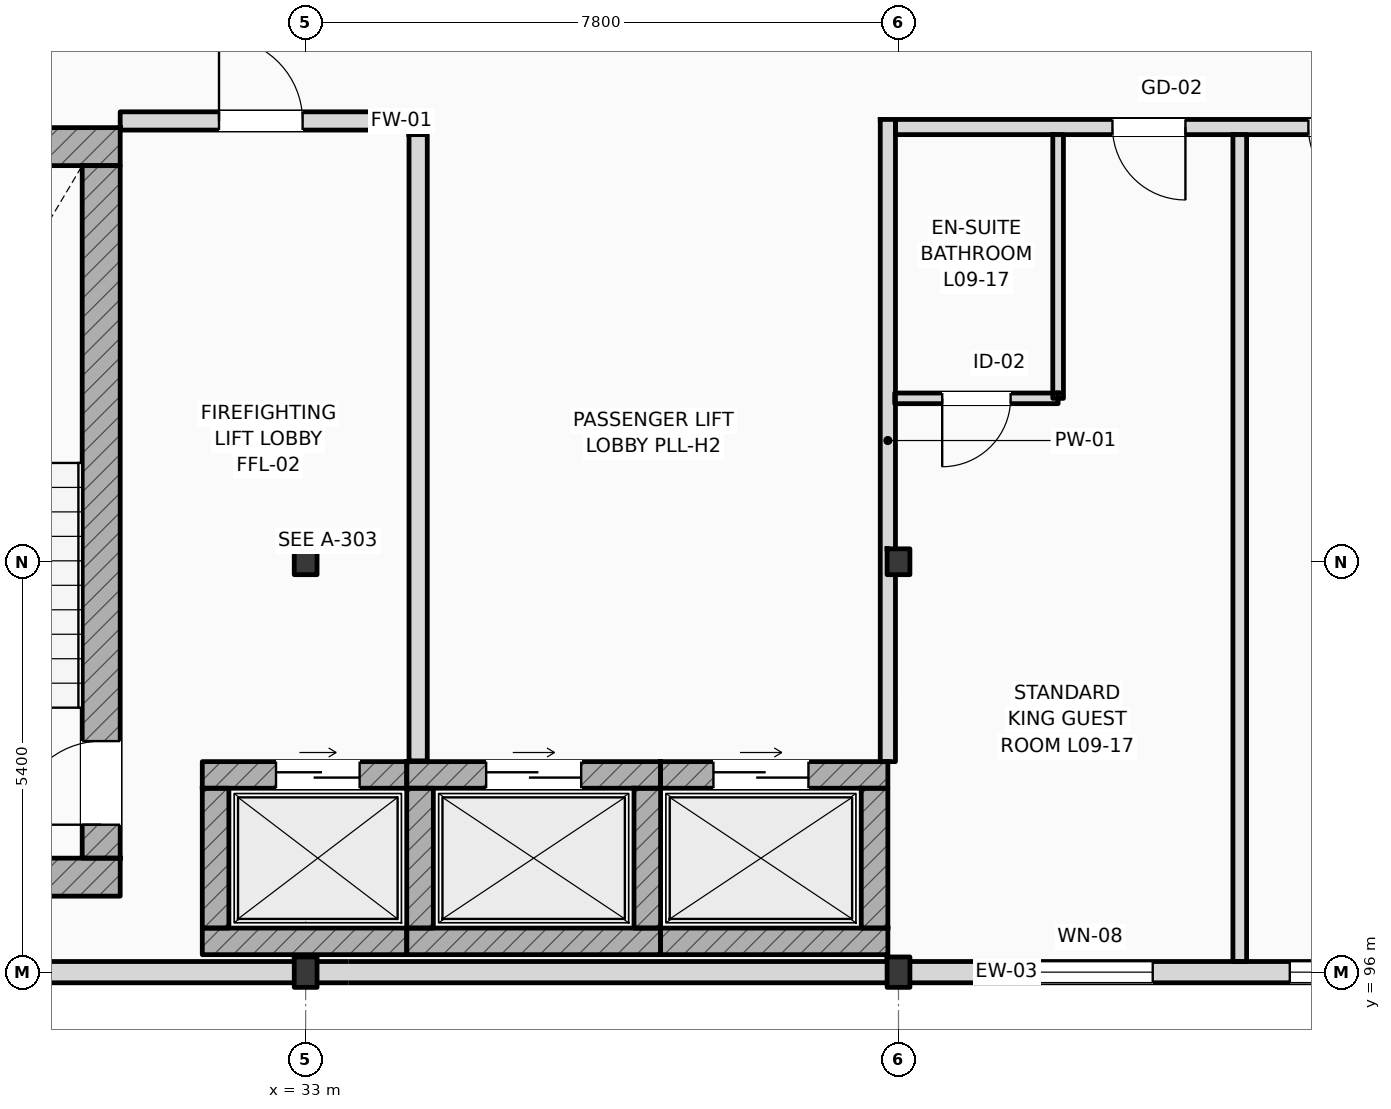
"""IFC4 building model, lengths in metres.
Left out: names, types, materials, properties, quantities, classifications, styles, units other than length and angle.
Written with IfcOpenShell. Run it as: python <this file> out.ifc"""

import sys

from ifc_helpers import new_model, si_unit, direction, frame, frame_2d, origin, origin_2d, place, context, subcontext, project, spatial, rectangle, i_section, extrude, element, fill, save


model = new_model("IFC4")
c1 = context("Model", 3, precision=1e-05, world=origin(), true_north=direction((0.0, 1.0)))
c2 = subcontext(c1, "Body", "Model", "MODEL_VIEW")
j1 = project(units=[si_unit("LENGTHUNIT", "METRE"), si_unit("PLANEANGLEUNIT", "RADIAN")], contexts=[c1])
p1 = place(None, origin())
s1 = spatial("IfcSite", under=j1, at=p1, CompositionType="ELEMENT")
p2 = place(p1, origin())
s2 = spatial("IfcBuilding", under=s1, at=p2, CompositionType="ELEMENT")
p3 = place(p2, frame((0.0, 0.0, 39.0)))
s3 = spatial("IfcBuildingStorey", under=s2, at=p3, CompositionType="ELEMENT", Elevation=39.0)
p4 = place(p3, frame((33.0, 96.0, 0.0), z_axis=(0.0, 0.0, 1.0), x_axis=(1.0, 0.0, 0.0)))
e1 = element("IfcColumn", 1, at=p4, inside=s3, PredefinedType="COLUMN", context=c2, shape_type="SweptSolid", body=[
    extrude(i_section(OverallWidth=0.3, OverallDepth=0.4, WebThickness=0.013, FlangeThickness=0.024, FilletRadius=0.027, at=origin_2d()), origin(), (0.0, 0.0, 1.0), 3.6),
])
p5 = place(p3, frame((33.0, 101.4, 0.0), z_axis=(0.0, 0.0, 1.0), x_axis=(1.0, 0.0, 0.0)))
e2 = element("IfcColumn", 2, at=p5, inside=s3, PredefinedType="COLUMN", context=c2, shape_type="SweptSolid", body=[
    extrude(i_section(OverallWidth=0.3, OverallDepth=0.34, WebThickness=0.012, FlangeThickness=0.021, FilletRadius=0.027, at=origin_2d()), origin(), (0.0, 0.0, 1.0), 3.6),
])
p6 = place(p3, frame((40.8, 96.0, 0.0), z_axis=(0.0, 0.0, 1.0), x_axis=(1.0, 0.0, 0.0)))
e3 = element("IfcColumn", 3, at=p6, inside=s3, PredefinedType="COLUMN", context=c2, shape_type="SweptSolid", body=[
    extrude(i_section(OverallWidth=0.3, OverallDepth=0.4, WebThickness=0.013, FlangeThickness=0.024, FilletRadius=0.027, at=origin_2d()), origin(), (0.0, 0.0, 1.0), 3.6),
])
p7 = place(p3, frame((40.8, 101.4, 0.0), z_axis=(0.0, 0.0, 1.0), x_axis=(1.0, 0.0, 0.0)))
e4 = element("IfcColumn", 4, at=p7, inside=s3, PredefinedType="COLUMN", context=c2, shape_type="SweptSolid", body=[
    extrude(i_section(OverallWidth=0.3, OverallDepth=0.34, WebThickness=0.012, FlangeThickness=0.021, FilletRadius=0.027, at=origin_2d()), origin(), (0.0, 0.0, 1.0), 3.6),
])
for number, where, z_axis, x_axis in (
    (5, (25.4, 106.862, 0.0), (0.0, 0.0, 1.0), (1.0, 0.0, 0.0)),
    (6, (25.4, 97.25, 0.0), (0.0, 0.0, 1.0), (1.0, 0.0, 0.0)),
):
    element("IfcWall", number, at=place(p3, frame(where, z_axis=z_axis, x_axis=x_axis)), inside=s3, PredefinedType="SHEAR", context=c2, shape_type="SweptSolid", body=[
        extrude(rectangle(XDim=5.16, YDim=0.5, at=frame_2d((2.58, 0.0))), origin(), (0.0, 0.0, 1.0), 3.6),
    ])
p8 = place(p3, frame((30.31, 97.5, 0.0), z_axis=(0.0, 0.0, 1.0), x_axis=(0.0, 1.0, 0.0)))
e7 = element("IfcWall", 7, at=p8, inside=s3, PredefinedType="SHEAR", context=c2, shape_type="SweptSolid", body=[
    extrude(rectangle(XDim=9.112, YDim=0.5, at=frame_2d((4.556, 0.0))), origin(), (0.0, 0.0, 1.0), 3.6),
])
p9 = place(p8, frame((0.44, 0.0, 0.0)))
e8 = element("IfcOpeningElement", 8, at=p9, cuts=e7, PredefinedType="OPENING", context=c2, shape_type="SweptSolid", body=[
    extrude(rectangle(XDim=1.1, YDim=2.2, at=frame_2d((0.55, 1.1))), frame((0.0, 0.26, 0.0), z_axis=(0.0, -1.0, 0.0), x_axis=(1.0, 0.0, 0.0)), (0.0, 0.0, 1.0), 0.52),
])
p10 = place(p3, frame((25.2, 96.0, 0.0), z_axis=(0.0, 0.0, 1.0), x_axis=(1.0, 0.0, 0.0)))
e9 = element("IfcWall", 9, at=p10, inside=s3, PredefinedType="STANDARD", context=c2, shape_type="SweptSolid", body=[
    extrude(rectangle(XDim=70.2, YDim=0.28, at=frame_2d((35.1, 0.0))), origin(), (0.0, 0.0, 1.0), 2.92),
])
p11 = place(p10, frame((16.695, 0.0, 0.9)))
e10 = element("IfcOpeningElement", 10, at=p11, cuts=e9, PredefinedType="OPENING", context=c2, shape_type="SweptSolid", body=[
    extrude(rectangle(XDim=2.25, YDim=1.84, at=frame_2d((1.125, 0.92))), frame((0.0, 0.15, 0.0), z_axis=(0.0, -1.0, 0.0), x_axis=(1.0, 0.0, 0.0)), (0.0, 0.0, 1.0), 0.3),
])
p12 = place(p10, frame((20.748, 0.0, 0.9)))
e11 = element("IfcOpeningElement", 11, at=p12, cuts=e9, PredefinedType="OPENING", context=c2, shape_type="SweptSolid", body=[
    extrude(rectangle(XDim=1.8, YDim=1.84, at=frame_2d((0.9, 0.92))), frame((0.0, 0.15, 0.0), z_axis=(0.0, -1.0, 0.0), x_axis=(1.0, 0.0, 0.0)), (0.0, 0.0, 1.0), 0.3),
])
p13 = place(p10, frame((25.963, 0.0, 0.9)))
e12 = element("IfcOpeningElement", 12, at=p13, cuts=e9, PredefinedType="OPENING", context=c2, shape_type="SweptSolid", body=[
    extrude(rectangle(XDim=2.55, YDim=1.84, at=frame_2d((1.275, 0.92))), frame((0.0, 0.15, 0.0), z_axis=(0.0, -1.0, 0.0), x_axis=(1.0, 0.0, 0.0)), (0.0, 0.0, 1.0), 0.3),
])
p14 = place(p10, frame((32.177, 0.0, 0.9)))
e13 = element("IfcOpeningElement", 13, at=p14, cuts=e9, PredefinedType="OPENING", context=c2, shape_type="SweptSolid", body=[
    extrude(rectangle(XDim=1.35, YDim=1.84, at=frame_2d((0.675, 0.92))), frame((0.0, 0.15, 0.0), z_axis=(0.0, -1.0, 0.0), x_axis=(1.0, 0.0, 0.0)), (0.0, 0.0, 1.0), 0.3),
])
p15 = place(p10, frame((35.267, 0.0, 0.9)))
e14 = element("IfcOpeningElement", 14, at=p15, cuts=e9, PredefinedType="OPENING", context=c2, shape_type="SweptSolid", body=[
    extrude(rectangle(XDim=2.85, YDim=1.84, at=frame_2d((1.425, 0.92))), frame((0.0, 0.15, 0.0), z_axis=(0.0, -1.0, 0.0), x_axis=(1.0, 0.0, 0.0)), (0.0, 0.0, 1.0), 0.3),
])
p16 = place(p10, frame((55.56, 0.0, 0.9)))
e15 = element("IfcOpeningElement", 15, at=p16, cuts=e9, PredefinedType="OPENING", context=c2, shape_type="SweptSolid", body=[
    extrude(rectangle(XDim=1.8, YDim=1.84, at=frame_2d((0.9, 0.92))), frame((0.0, 0.15, 0.0), z_axis=(0.0, -1.0, 0.0), x_axis=(1.0, 0.0, 0.0)), (0.0, 0.0, 1.0), 0.3),
])
p17 = place(p10, frame((59.093, 0.0, 0.9)))
e16 = element("IfcOpeningElement", 16, at=p17, cuts=e9, PredefinedType="OPENING", context=c2, shape_type="SweptSolid", body=[
    extrude(rectangle(XDim=2.412, YDim=1.84, at=frame_2d((1.206, 0.92))), frame((0.0, 0.15, 0.0), z_axis=(0.0, -1.0, 0.0), x_axis=(1.0, 0.0, 0.0)), (0.0, 0.0, 1.0), 0.3),
])
p18 = place(p10, frame((63.325, 0.0, 0.9)))
e17 = element("IfcOpeningElement", 17, at=p18, cuts=e9, PredefinedType="OPENING", context=c2, shape_type="SweptSolid", body=[
    extrude(rectangle(XDim=1.8, YDim=1.84, at=frame_2d((0.9, 0.92))), frame((0.0, 0.15, 0.0), z_axis=(0.0, -1.0, 0.0), x_axis=(1.0, 0.0, 0.0)), (0.0, 0.0, 1.0), 0.3),
])
p19 = place(p10, frame((66.718, 0.0, 0.9)))
e18 = element("IfcOpeningElement", 18, at=p19, cuts=e9, PredefinedType="OPENING", context=c2, shape_type="SweptSolid", body=[
    extrude(rectangle(XDim=2.472, YDim=1.84, at=frame_2d((1.236, 0.92))), frame((0.0, 0.15, 0.0), z_axis=(0.0, -1.0, 0.0), x_axis=(1.0, 0.0, 0.0)), (0.0, 0.0, 1.0), 0.3),
])
p20 = place(p3, frame((31.64, 98.595, 0.0), z_axis=(0.0, 0.0, 1.0), x_axis=(1.0, 0.0, 0.0)))
e19 = element("IfcWall", 19, at=p20, inside=s3, PredefinedType="SHEAR", context=c2, shape_type="SweptSolid", body=[
    extrude(rectangle(XDim=2.69, YDim=0.35, at=frame_2d((1.345, 0.0))), origin(), (0.0, 0.0, 1.0), 3.38),
])
p21 = place(p20, frame((0.97, 0.0, 0.0)))
e20 = element("IfcOpeningElement", 20, at=p21, cuts=e19, PredefinedType="OPENING", context=c2, shape_type="SweptSolid", body=[
    extrude(rectangle(XDim=1.1, YDim=2.2, at=frame_2d((0.55, 1.1))), frame((0.0, 0.185, 0.0), z_axis=(0.0, -1.0, 0.0), x_axis=(1.0, 0.0, 0.0)), (0.0, 0.0, 1.0), 0.37),
])
p22 = place(p3, frame((31.64, 96.405, 0.0), z_axis=(0.0, 0.0, 1.0), x_axis=(1.0, 0.0, 0.0)))
e21 = element("IfcWall", 21, at=p22, inside=s3, PredefinedType="SHEAR", context=c2, shape_type="SweptSolid", body=[
    extrude(rectangle(XDim=2.69, YDim=0.35, at=frame_2d((1.345, 0.0))), origin(), (0.0, 0.0, 1.0), 3.38),
])
p23 = place(p3, frame((31.815, 96.58, 0.0), z_axis=(0.0, 0.0, 1.0), x_axis=(0.0, 1.0, 0.0)))
e22 = element("IfcWall", 22, at=p23, inside=s3, PredefinedType="SHEAR", context=c2, shape_type="SweptSolid", body=[
    extrude(rectangle(XDim=1.84, YDim=0.35, at=frame_2d((0.92, 0.0))), origin(), (0.0, 0.0, 1.0), 3.38),
])
p24 = place(p3, frame((34.33, 98.595, 0.0), z_axis=(0.0, 0.0, 1.0), x_axis=(1.0, 0.0, 0.0)))
e23 = element("IfcWall", 23, at=p24, inside=s3, PredefinedType="SHEAR", context=c2, shape_type="SweptSolid", body=[
    extrude(rectangle(XDim=3.34, YDim=0.35, at=frame_2d((1.67, 0.0))), origin(), (0.0, 0.0, 1.0), 3.38),
])
p25 = place(p24, frame((1.045, 0.0, 0.0)))
e24 = element("IfcOpeningElement", 24, at=p25, cuts=e23, PredefinedType="OPENING", context=c2, shape_type="SweptSolid", body=[
    extrude(rectangle(XDim=1.25, YDim=2.25, at=frame_2d((0.625, 1.125))), frame((0.0, 0.185, 0.0), z_axis=(0.0, -1.0, 0.0), x_axis=(1.0, 0.0, 0.0)), (0.0, 0.0, 1.0), 0.37),
])
p26 = place(p3, frame((34.33, 96.405, 0.0), z_axis=(0.0, 0.0, 1.0), x_axis=(1.0, 0.0, 0.0)))
e25 = element("IfcWall", 25, at=p26, inside=s3, PredefinedType="SHEAR", context=c2, shape_type="SweptSolid", body=[
    extrude(rectangle(XDim=3.34, YDim=0.35, at=frame_2d((1.67, 0.0))), origin(), (0.0, 0.0, 1.0), 3.38),
])
for number, where, z_axis, x_axis in (
    (26, (34.505, 96.58, 0.0), (0.0, 0.0, 1.0), (0.0, 1.0, 0.0)),
    (27, (37.495, 96.58, 0.0), (0.0, 0.0, 1.0), (0.0, 1.0, 0.0)),
):
    element("IfcWall", number, at=place(p3, frame(where, z_axis=z_axis, x_axis=x_axis)), inside=s3, PredefinedType="SHEAR", context=c2, shape_type="SweptSolid", body=[
        extrude(rectangle(XDim=1.84, YDim=0.35, at=frame_2d((0.92, 0.0))), origin(), (0.0, 0.0, 1.0), 3.38),
    ])
p27 = place(p3, frame((37.67, 98.595, 0.0), z_axis=(0.0, 0.0, 1.0), x_axis=(1.0, 0.0, 0.0)))
e28 = element("IfcWall", 28, at=p27, inside=s3, PredefinedType="SHEAR", context=c2, shape_type="SweptSolid", body=[
    extrude(rectangle(XDim=2.99, YDim=0.35, at=frame_2d((1.495, 0.0))), origin(), (0.0, 0.0, 1.0), 3.38),
])
p28 = place(p27, frame((0.695, 0.0, 0.0)))
e29 = element("IfcOpeningElement", 29, at=p28, cuts=e28, PredefinedType="OPENING", context=c2, shape_type="SweptSolid", body=[
    extrude(rectangle(XDim=1.25, YDim=2.25, at=frame_2d((0.625, 1.125))), frame((0.0, 0.185, 0.0), z_axis=(0.0, -1.0, 0.0), x_axis=(1.0, 0.0, 0.0)), (0.0, 0.0, 1.0), 0.37),
])
p29 = place(p3, frame((37.67, 96.405, 0.0), z_axis=(0.0, 0.0, 1.0), x_axis=(1.0, 0.0, 0.0)))
e30 = element("IfcWall", 30, at=p29, inside=s3, PredefinedType="SHEAR", context=c2, shape_type="SweptSolid", body=[
    extrude(rectangle(XDim=2.99, YDim=0.35, at=frame_2d((1.495, 0.0))), origin(), (0.0, 0.0, 1.0), 3.38),
])
p30 = place(p3, frame((40.485, 96.58, 0.0), z_axis=(0.0, 0.0, 1.0), x_axis=(0.0, 1.0, 0.0)))
e31 = element("IfcWall", 31, at=p30, inside=s3, PredefinedType="SHEAR", context=c2, shape_type="SweptSolid", body=[
    extrude(rectangle(XDim=1.84, YDim=0.35, at=frame_2d((0.92, 0.0))), origin(), (0.0, 0.0, 1.0), 3.01),
])
p31 = place(p3, frame((34.48, 98.78, 0.0), z_axis=(0.0, 0.0, 1.0), x_axis=(0.0, 1.0, 0.0)))
e32 = element("IfcWall", 32, at=p31, inside=s3, PredefinedType="STANDARD", context=c2, shape_type="SweptSolid", body=[
    extrude(rectangle(XDim=8.24, YDim=0.24, at=frame_2d((4.12, 0.0))), origin(), (0.0, 0.0, 1.0), 3.38),
])
p32 = place(p3, frame((30.56, 107.2, 0.0), z_axis=(0.0, 0.0, 1.0), x_axis=(1.0, 0.0, 0.0)))
e33 = element("IfcWall", 33, at=p32, inside=s3, PredefinedType="STANDARD", context=c2, shape_type="SweptSolid", body=[
    extrude(rectangle(XDim=4.1, YDim=0.24, at=frame_2d((2.05, 0.0))), origin(), (0.0, 0.0, 1.0), 3.38),
])
p33 = place(p32, frame((1.3, 0.0, 0.0)))
e34 = element("IfcOpeningElement", 34, at=p33, cuts=e33, PredefinedType="OPENING", context=c2, shape_type="SweptSolid", body=[
    extrude(rectangle(XDim=1.1, YDim=2.2, at=frame_2d((0.55, 1.1))), frame((0.0, 0.13, 0.0), z_axis=(0.0, -1.0, 0.0), x_axis=(1.0, 0.0, 0.0)), (0.0, 0.0, 1.0), 0.26),
])
p34 = place(p3, frame((40.76, 107.12, 0.0), z_axis=(0.0, 0.0, 1.0), x_axis=(1.0, 0.0, 0.0)))
e35 = element("IfcWall", 35, at=p34, inside=s3, PredefinedType="PARTITIONING", context=c2, shape_type="SweptSolid", body=[
    extrude(rectangle(XDim=23.44, YDim=0.2, at=frame_2d((11.72, 0.0))), origin(), (0.0, 0.0, 1.0), 3.38),
])
p35 = place(p34, frame((2.855, 0.0, 0.0)))
e36 = element("IfcOpeningElement", 36, at=p35, cuts=e35, PredefinedType="OPENING", context=c2, shape_type="SweptSolid", body=[
    extrude(rectangle(XDim=0.96, YDim=2.2, at=frame_2d((0.48, 1.1))), frame((0.0, 0.11, 0.0), z_axis=(0.0, -1.0, 0.0), x_axis=(1.0, 0.0, 0.0)), (0.0, 0.0, 1.0), 0.22),
])
p36 = place(p34, frame((5.433, 0.0, 0.0)))
e37 = element("IfcOpeningElement", 37, at=p36, cuts=e35, PredefinedType="OPENING", context=c2, shape_type="SweptSolid", body=[
    extrude(rectangle(XDim=0.96, YDim=2.2, at=frame_2d((0.48, 1.1))), frame((0.0, 0.11, 0.0), z_axis=(0.0, -1.0, 0.0), x_axis=(1.0, 0.0, 0.0)), (0.0, 0.0, 1.0), 0.22),
])
p37 = place(p34, frame((12.273, 0.0, 0.0)))
e38 = element("IfcOpeningElement", 38, at=p37, cuts=e35, PredefinedType="OPENING", context=c2, shape_type="SweptSolid", body=[
    extrude(rectangle(XDim=0.96, YDim=2.2, at=frame_2d((0.48, 1.1))), frame((0.0, 0.11, 0.0), z_axis=(0.0, -1.0, 0.0), x_axis=(1.0, 0.0, 0.0)), (0.0, 0.0, 1.0), 0.22),
])
p38 = place(p34, frame((16.963, 0.0, 0.0)))
e39 = element("IfcOpeningElement", 39, at=p38, cuts=e35, PredefinedType="OPENING", context=c2, shape_type="SweptSolid", body=[
    extrude(rectangle(XDim=0.96, YDim=2.2, at=frame_2d((0.48, 1.1))), frame((0.0, 0.11, 0.0), z_axis=(0.0, -1.0, 0.0), x_axis=(1.0, 0.0, 0.0)), (0.0, 0.0, 1.0), 0.22),
])
p39 = place(p34, frame((19.578, 0.0, 0.0)))
e40 = element("IfcOpeningElement", 40, at=p39, cuts=e35, PredefinedType="OPENING", context=c2, shape_type="SweptSolid", body=[
    extrude(rectangle(XDim=0.96, YDim=2.2, at=frame_2d((0.48, 1.1))), frame((0.0, 0.11, 0.0), z_axis=(0.0, -1.0, 0.0), x_axis=(1.0, 0.0, 0.0)), (0.0, 0.0, 1.0), 0.22),
])
p40 = place(p3, frame((40.66, 98.77, 0.0), z_axis=(0.0, 0.0, 1.0), x_axis=(0.0, 1.0, 0.0)))
e41 = element("IfcWall", 41, at=p40, inside=s3, PredefinedType="PARTITIONING", context=c2, shape_type="SweptSolid", body=[
    extrude(rectangle(XDim=8.45, YDim=0.2, at=frame_2d((4.225, 0.0))), origin(), (0.0, 0.0, 1.0), 3.01),
])
p41 = place(p3, frame((45.29, 96.14, 0.0), z_axis=(0.0, 0.0, 1.0), x_axis=(0.0, 1.0, 0.0)))
e42 = element("IfcWall", 42, at=p41, inside=s3, PredefinedType="PARTITIONING", context=c2, shape_type="SweptSolid", body=[
    extrude(rectangle(XDim=10.88, YDim=0.18, at=frame_2d((5.44, 0.0))), origin(), (0.0, 0.0, 1.0), 3.38),
])
p42 = place(p3, frame((42.9, 103.55, 0.0), z_axis=(0.0, 0.0, 1.0), x_axis=(0.0, 1.0, 0.0)))
e43 = element("IfcWall", 43, at=p42, inside=s3, PredefinedType="PARTITIONING", context=c2, shape_type="SweptSolid", body=[
    extrude(rectangle(XDim=3.47, YDim=0.14, at=frame_2d((1.735, 0.0))), origin(), (0.0, 0.0, 1.0), 3.38),
])
p43 = place(p3, frame((40.75, 103.55, 0.0), z_axis=(0.0, 0.0, 1.0), x_axis=(1.0, 0.0, 0.0)))
e44 = element("IfcWall", 44, at=p43, inside=s3, PredefinedType="PARTITIONING", context=c2, shape_type="SweptSolid", body=[
    extrude(rectangle(XDim=2.15, YDim=0.14, at=frame_2d((1.075, 0.0))), origin(), (0.0, 0.0, 1.0), 3.38),
])
p44 = place(p43, frame((0.625, 0.0, 0.0)))
e45 = element("IfcOpeningElement", 45, at=p44, cuts=e44, PredefinedType="OPENING", context=c2, shape_type="SweptSolid", body=[
    extrude(rectangle(XDim=0.9, YDim=2.1, at=frame_2d((0.45, 1.05))), frame((0.0, 0.08, 0.0), z_axis=(0.0, -1.0, 0.0), x_axis=(1.0, 0.0, 0.0)), (0.0, 0.0, 1.0), 0.16),
])
p45 = place(p11, origin())
e46 = element("IfcWindow", 46, at=p45, inside=s3, PartitioningType="DOUBLE_PANEL_VERTICAL", PredefinedType="WINDOW", context=c2, shape_type="SweptSolid", body=[
    extrude(rectangle(XDim=2.25, YDim=1.84, at=frame_2d((1.125, 0.92))), frame((0.0, 0.03, 0.0), z_axis=(0.0, -1.0, 0.0), x_axis=(1.0, 0.0, 0.0)), (0.0, 0.0, 1.0), 0.06),
])
fill(e10, e46)
p46 = place(p12, origin())
e47 = element("IfcWindow", 47, at=p46, inside=s3, PartitioningType="DOUBLE_PANEL_VERTICAL", PredefinedType="WINDOW", context=c2, shape_type="SweptSolid", body=[
    extrude(rectangle(XDim=1.8, YDim=1.84, at=frame_2d((0.9, 0.92))), frame((0.0, 0.03, 0.0), z_axis=(0.0, -1.0, 0.0), x_axis=(1.0, 0.0, 0.0)), (0.0, 0.0, 1.0), 0.06),
])
fill(e11, e47)
p47 = place(p9, origin())
e48 = element("IfcDoor", 48, at=p47, inside=s3, OperationType="SINGLE_SWING_LEFT", PredefinedType="DOOR", context=c2, shape_type="SweptSolid", body=[
    extrude(rectangle(XDim=1.1, YDim=2.2, at=frame_2d((0.55, 1.1))), frame((0.0, 0.025, 0.0), z_axis=(0.0, -1.0, 0.0), x_axis=(1.0, 0.0, 0.0)), (0.0, 0.0, 1.0), 0.05),
])
fill(e8, e48)
p48 = place(p21, origin())
e49 = element("IfcDoor", 49, at=p48, inside=s3, OperationType="SLIDING_TO_LEFT", PredefinedType="DOOR", context=c2, shape_type="SweptSolid", body=[
    extrude(rectangle(XDim=1.1, YDim=2.2, at=frame_2d((0.55, 1.1))), frame((0.0, 0.025, 0.0), z_axis=(0.0, -1.0, 0.0), x_axis=(1.0, 0.0, 0.0)), (0.0, 0.0, 1.0), 0.05),
])
fill(e20, e49)
p49 = place(p25, origin())
e50 = element("IfcDoor", 50, at=p49, inside=s3, OperationType="SLIDING_TO_LEFT", PredefinedType="DOOR", context=c2, shape_type="SweptSolid", body=[
    extrude(rectangle(XDim=1.25, YDim=2.25, at=frame_2d((0.625, 1.125))), frame((0.0, 0.025, 0.0), z_axis=(0.0, -1.0, 0.0), x_axis=(1.0, 0.0, 0.0)), (0.0, 0.0, 1.0), 0.05),
])
fill(e24, e50)
p50 = place(p28, origin())
e51 = element("IfcDoor", 51, at=p50, inside=s3, OperationType="SLIDING_TO_LEFT", PredefinedType="DOOR", context=c2, shape_type="SweptSolid", body=[
    extrude(rectangle(XDim=1.25, YDim=2.25, at=frame_2d((0.625, 1.125))), frame((0.0, 0.025, 0.0), z_axis=(0.0, -1.0, 0.0), x_axis=(1.0, 0.0, 0.0)), (0.0, 0.0, 1.0), 0.05),
])
fill(e29, e51)
p51 = place(p33, origin())
e52 = element("IfcDoor", 52, at=p51, inside=s3, OperationType="SINGLE_SWING_LEFT", PredefinedType="DOOR", context=c2, shape_type="SweptSolid", body=[
    extrude(rectangle(XDim=1.1, YDim=2.2, at=frame_2d((0.55, 1.1))), frame((0.0, 0.025, 0.0), z_axis=(0.0, -1.0, 0.0), x_axis=(1.0, 0.0, 0.0)), (0.0, 0.0, 1.0), 0.05),
])
fill(e34, e52)
p52 = place(p35, frame((0.96, 0.0, 0.0), z_axis=(0.0, 0.0, 1.0), x_axis=(-1.0, 0.0, 0.0)))
e53 = element("IfcDoor", 53, at=p52, inside=s3, OperationType="SINGLE_SWING_RIGHT", PredefinedType="DOOR", context=c2, shape_type="SweptSolid", body=[
    extrude(rectangle(XDim=0.96, YDim=2.2, at=frame_2d((0.48, 1.1))), frame((0.0, 0.025, 0.0), z_axis=(0.0, -1.0, 0.0), x_axis=(1.0, 0.0, 0.0)), (0.0, 0.0, 1.0), 0.05),
])
fill(e36, e53)
p53 = place(p44, frame((0.9, 0.0, 0.0), z_axis=(0.0, 0.0, 1.0), x_axis=(-1.0, 0.0, 0.0)))
e54 = element("IfcDoor", 54, at=p53, inside=s3, OperationType="SINGLE_SWING_LEFT", PredefinedType="DOOR", context=c2, shape_type="SweptSolid", body=[
    extrude(rectangle(XDim=0.9, YDim=2.1, at=frame_2d((0.45, 1.05))), frame((0.0, 0.025, 0.0), z_axis=(0.0, -1.0, 0.0), x_axis=(1.0, 0.0, 0.0)), (0.0, 0.0, 1.0), 0.05),
])
fill(e45, e54)
p54 = place(p36, frame((0.96, 0.0, 0.0), z_axis=(0.0, 0.0, 1.0), x_axis=(-1.0, 0.0, 0.0)))
e55 = element("IfcDoor", 55, at=p54, inside=s3, OperationType="SINGLE_SWING_RIGHT", PredefinedType="DOOR", context=c2, shape_type="SweptSolid", body=[
    extrude(rectangle(XDim=0.96, YDim=2.2, at=frame_2d((0.48, 1.1))), frame((0.0, 0.025, 0.0), z_axis=(0.0, -1.0, 0.0), x_axis=(1.0, 0.0, 0.0)), (0.0, 0.0, 1.0), 0.05),
])
fill(e37, e55)
save(model, sys.argv[1])
